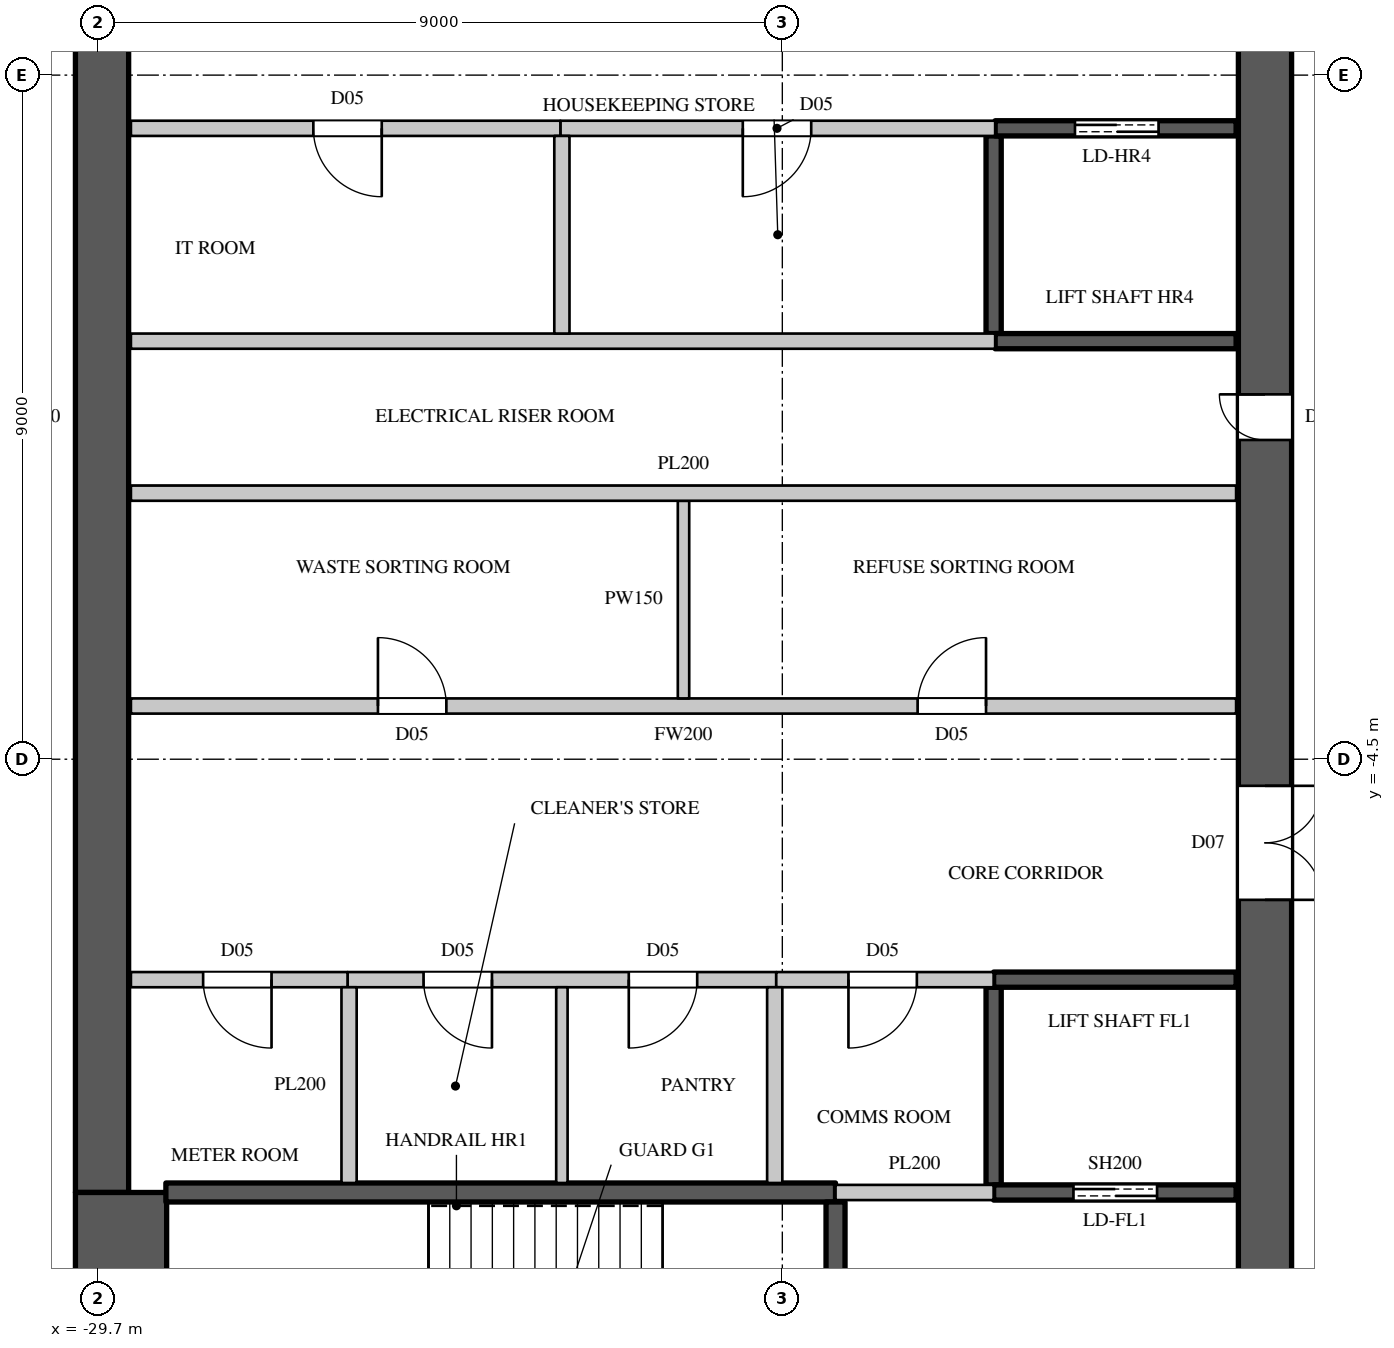
"""IFC4 building model, lengths in metres.
Left out: names, types, materials, properties, quantities, classifications, styles, units other than length and angle.
Written with IfcOpenShell. Run it as: python <this file> out.ifc"""

import sys

from ifc_helpers import new_model, si_unit, direction, frame, frame_2d, origin, place, context, subcontext, project, spatial, rectangle, extrude, element, fill, save


model = new_model("IFC4")
c1 = context("Model", 3, precision=1e-05, world=origin(), true_north=direction((0.0, 1.0)))
c2 = subcontext(c1, "Body", "Model", "MODEL_VIEW")
j1 = project(units=[si_unit("LENGTHUNIT", "METRE"), si_unit("PLANEANGLEUNIT", "RADIAN")], contexts=[c1])
p1 = place(None, origin())
s1 = spatial("IfcSite", under=j1, at=p1, CompositionType="ELEMENT")
p2 = place(p1, origin())
s2 = spatial("IfcBuilding", under=s1, at=p2, CompositionType="ELEMENT")
p3 = place(p2, frame((0.0, 0.0, 292.6)))
s3 = spatial("IfcBuildingStorey", under=s2, at=p3, CompositionType="ELEMENT", Elevation=292.6)
p4 = place(p3, frame((-14.35, -14.8, 0.0), z_axis=(0.0, 0.0, 1.0), x_axis=(0.0, 1.0, 0.0)))
e1 = element("IfcWall", 1, at=p4, inside=s3, PredefinedType="SHEAR", context=c2, shape_type="SweptSolid", body=[
    extrude(rectangle(XDim=29.6, YDim=0.7, at=frame_2d((14.8, 0.0))), origin(), (0.0, 0.0, 1.0), 4.1),
])
p5 = place(p4, frame((1.55, 0.0, 0.0)))
e2 = element("IfcOpeningElement", 2, at=p5, cuts=e1, PredefinedType="OPENING", context=c2, shape_type="SweptSolid", body=[
    extrude(rectangle(XDim=1.5, YDim=2.4, at=frame_2d((0.75, 1.2))), frame((0.0, 0.36, 0.0), z_axis=(0.0, -1.0, 0.0), x_axis=(1.0, 0.0, 0.0)), (0.0, 0.0, 1.0), 0.72),
])
p6 = place(p4, frame((26.55, 0.0, 0.0)))
e3 = element("IfcOpeningElement", 3, at=p6, cuts=e1, PredefinedType="OPENING", context=c2, shape_type="SweptSolid", body=[
    extrude(rectangle(XDim=1.5, YDim=2.4, at=frame_2d((0.75, 1.2))), frame((0.0, 0.36, 0.0), z_axis=(0.0, -1.0, 0.0), x_axis=(1.0, 0.0, 0.0)), (0.0, 0.0, 1.0), 0.72),
])
p7 = place(p4, frame((8.45, 0.0, 0.0)))
e4 = element("IfcOpeningElement", 4, at=p7, cuts=e1, PredefinedType="OPENING", context=c2, shape_type="SweptSolid", body=[
    extrude(rectangle(XDim=1.5, YDim=2.4, at=frame_2d((0.75, 1.2))), frame((0.0, 0.36, 0.0), z_axis=(0.0, -1.0, 0.0), x_axis=(1.0, 0.0, 0.0)), (0.0, 0.0, 1.0), 0.72),
])
p8 = place(p4, frame((19.65, 0.0, 0.0)))
e5 = element("IfcOpeningElement", 5, at=p8, cuts=e1, PredefinedType="OPENING", context=c2, shape_type="SweptSolid", body=[
    extrude(rectangle(XDim=1.5, YDim=2.4, at=frame_2d((0.75, 1.2))), frame((0.0, 0.36, 0.0), z_axis=(0.0, -1.0, 0.0), x_axis=(1.0, 0.0, 0.0)), (0.0, 0.0, 1.0), 0.72),
])
p9 = place(p4, frame((14.5, 0.0, 0.0)))
e6 = element("IfcOpeningElement", 6, at=p9, cuts=e1, PredefinedType="OPENING", context=c2, shape_type="SweptSolid", body=[
    extrude(rectangle(XDim=0.6, YDim=2.0, at=frame_2d((0.3, 1.0))), frame((0.0, 0.36, 0.0), z_axis=(0.0, -1.0, 0.0), x_axis=(1.0, 0.0, 0.0)), (0.0, 0.0, 1.0), 0.72),
])
p10 = place(p3, frame((-29.65, -10.2, 0.0), z_axis=(0.0, 0.0, 1.0), x_axis=(0.0, 1.0, 0.0)))
e7 = element("IfcWall", 7, at=p10, inside=s3, PredefinedType="SHEAR", context=c2, shape_type="SweptSolid", body=[
    extrude(rectangle(XDim=20.4, YDim=0.7, at=frame_2d((10.2, 0.0))), origin(), (0.0, 0.0, 1.0), 4.1),
])
p11 = place(p3, frame((-29.4, -14.8, 0.0), z_axis=(0.0, 0.0, 1.0), x_axis=(0.0, 1.0, 0.0)))
e8 = element("IfcWall", 8, at=p11, inside=s3, PredefinedType="SHEAR", context=c2, shape_type="SweptSolid", body=[
    extrude(rectangle(XDim=4.6, YDim=1.2, at=frame_2d((2.3, 0.0))), origin(), (0.0, 0.0, 1.0), 4.1),
])
p12 = place(p3, frame((-29.27, -3.8, 0.0), z_axis=(0.0, 0.0, 1.0), x_axis=(1.0, 0.0, 0.0)))
e9 = element("IfcWall", 9, at=p12, inside=s3, PredefinedType="PARTITIONING", context=c2, shape_type="SweptSolid", body=[
    extrude(rectangle(XDim=14.54, YDim=0.2, at=frame_2d((7.27, 0.0))), origin(), (0.0, 0.0, 1.0), 3.8),
])
p13 = place(p12, frame((3.25, 0.0, 0.0)))
e10 = element("IfcOpeningElement", 10, at=p13, cuts=e9, PredefinedType="OPENING", context=c2, shape_type="SweptSolid", body=[
    extrude(rectangle(XDim=0.9, YDim=2.2, at=frame_2d((0.45, 1.1))), frame((0.0, 0.11, 0.0), z_axis=(0.0, -1.0, 0.0), x_axis=(1.0, 0.0, 0.0)), (0.0, 0.0, 1.0), 0.22),
])
p14 = place(p12, frame((10.35, 0.0, 0.0)))
e11 = element("IfcOpeningElement", 11, at=p14, cuts=e9, PredefinedType="OPENING", context=c2, shape_type="SweptSolid", body=[
    extrude(rectangle(XDim=0.9, YDim=2.2, at=frame_2d((0.45, 1.1))), frame((0.0, 0.11, 0.0), z_axis=(0.0, -1.0, 0.0), x_axis=(1.0, 0.0, 0.0)), (0.0, 0.0, 1.0), 0.22),
])
p15 = place(p3, frame((-26.42, -7.4, 0.0), z_axis=(0.0, 0.0, 1.0), x_axis=(1.0, 0.0, 0.0)))
e12 = element("IfcWall", 12, at=p15, inside=s3, PredefinedType="PARTITIONING", context=c2, shape_type="SweptSolid", body=[
    extrude(rectangle(XDim=5.64, YDim=0.2, at=frame_2d((2.82, 0.0))), origin(), (0.0, 0.0, 1.0), 3.8),
])
p16 = place(p15, frame((1.0, 0.0, 0.0)))
e13 = element("IfcOpeningElement", 13, at=p16, cuts=e12, PredefinedType="OPENING", context=c2, shape_type="SweptSolid", body=[
    extrude(rectangle(XDim=0.9, YDim=2.2, at=frame_2d((0.45, 1.1))), frame((0.0, 0.11, 0.0), z_axis=(0.0, -1.0, 0.0), x_axis=(1.0, 0.0, 0.0)), (0.0, 0.0, 1.0), 0.22),
])
p17 = place(p15, frame((3.7, 0.0, 0.0)))
e14 = element("IfcOpeningElement", 14, at=p17, cuts=e12, PredefinedType="OPENING", context=c2, shape_type="SweptSolid", body=[
    extrude(rectangle(XDim=0.9, YDim=2.2, at=frame_2d((0.45, 1.1))), frame((0.0, 0.11, 0.0), z_axis=(0.0, -1.0, 0.0), x_axis=(1.0, 0.0, 0.0)), (0.0, 0.0, 1.0), 0.22),
])
p18 = place(p3, frame((-23.62, 3.8, 0.0), z_axis=(0.0, 0.0, 1.0), x_axis=(1.0, 0.0, 0.0)))
e15 = element("IfcWall", 15, at=p18, inside=s3, PredefinedType="PARTITIONING", context=c2, shape_type="SweptSolid", body=[
    extrude(rectangle(XDim=5.72, YDim=0.2, at=frame_2d((2.86, 0.0))), origin(), (0.0, 0.0, 1.0), 3.8),
])
p19 = place(p18, frame((2.4, 0.0, 0.0)))
e16 = element("IfcOpeningElement", 16, at=p19, cuts=e15, PredefinedType="OPENING", context=c2, shape_type="SweptSolid", body=[
    extrude(rectangle(XDim=0.9, YDim=2.2, at=frame_2d((0.45, 1.1))), frame((0.0, 0.11, 0.0), z_axis=(0.0, -1.0, 0.0), x_axis=(1.0, 0.0, 0.0)), (0.0, 0.0, 1.0), 0.22),
])
p20 = place(p3, frame((-23.6, -10.075, 0.0), z_axis=(0.0, 0.0, 1.0), x_axis=(0.0, 1.0, 0.0)))
e17 = element("IfcWall", 17, at=p20, inside=s3, PredefinedType="PARTITIONING", context=c2, shape_type="SweptSolid", body=[
    extrude(rectangle(XDim=2.575, YDim=0.15, at=frame_2d((1.288, 0.0))), origin(), (0.0, 0.0, 1.0), 3.8),
])
p21 = place(p3, frame((-22.0, -3.7, 0.0), z_axis=(0.0, 0.0, 1.0), x_axis=(0.0, 1.0, 0.0)))
e18 = element("IfcWall", 18, at=p21, inside=s3, PredefinedType="PARTITIONING", context=c2, shape_type="SweptSolid", body=[
    extrude(rectangle(XDim=2.6, YDim=0.15, at=frame_2d((1.3, 0.0))), origin(), (0.0, 0.0, 1.0), 3.8),
])
p22 = place(p3, frame((-29.27, -7.4, 0.0), z_axis=(0.0, 0.0, 1.0), x_axis=(1.0, 0.0, 0.0)))
e19 = element("IfcWall", 19, at=p22, inside=s3, PredefinedType="PARTITIONING", context=c2, shape_type="SweptSolid", body=[
    extrude(rectangle(XDim=2.85, YDim=0.2, at=frame_2d((1.425, 0.0))), origin(), (0.0, 0.0, 1.0), 3.8),
])
p23 = place(p22, frame((0.95, 0.0, 0.0)))
e20 = element("IfcOpeningElement", 20, at=p23, cuts=e19, PredefinedType="OPENING", context=c2, shape_type="SweptSolid", body=[
    extrude(rectangle(XDim=0.9, YDim=2.2, at=frame_2d((0.45, 1.1))), frame((0.0, 0.11, 0.0), z_axis=(0.0, -1.0, 0.0), x_axis=(1.0, 0.0, 0.0)), (0.0, 0.0, 1.0), 0.22),
])
p24 = place(p3, frame((-29.27, -1.0, 0.0), z_axis=(0.0, 0.0, 1.0), x_axis=(1.0, 0.0, 0.0)))
e21 = element("IfcWall", 21, at=p24, inside=s3, PredefinedType="PARTITIONING", context=c2, shape_type="SweptSolid", body=[
    extrude(rectangle(XDim=14.54, YDim=0.2, at=frame_2d((7.27, 0.0))), origin(), (0.0, 0.0, 1.0), 3.8),
])
p25 = place(p3, frame((-29.27, 1.0, 0.0), z_axis=(0.0, 0.0, 1.0), x_axis=(1.0, 0.0, 0.0)))
e22 = element("IfcWall", 22, at=p25, inside=s3, PredefinedType="PARTITIONING", context=c2, shape_type="SweptSolid", body=[
    extrude(rectangle(XDim=11.37, YDim=0.2, at=frame_2d((5.685, 0.0))), origin(), (0.0, 0.0, 1.0), 3.8),
])
p26 = place(p3, frame((-29.27, 3.8, 0.0), z_axis=(0.0, 0.0, 1.0), x_axis=(1.0, 0.0, 0.0)))
e23 = element("IfcWall", 23, at=p26, inside=s3, PredefinedType="PARTITIONING", context=c2, shape_type="SweptSolid", body=[
    extrude(rectangle(XDim=5.65, YDim=0.2, at=frame_2d((2.825, 0.0))), origin(), (0.0, 0.0, 1.0), 3.8),
])
p27 = place(p26, frame((2.4, 0.0, 0.0)))
e24 = element("IfcOpeningElement", 24, at=p27, cuts=e23, PredefinedType="OPENING", context=c2, shape_type="SweptSolid", body=[
    extrude(rectangle(XDim=0.9, YDim=2.2, at=frame_2d((0.45, 1.1))), frame((0.0, 0.11, 0.0), z_axis=(0.0, -1.0, 0.0), x_axis=(1.0, 0.0, 0.0)), (0.0, 0.0, 1.0), 0.22),
])
p28 = place(p3, frame((-26.4, -10.075, 0.0), z_axis=(0.0, 0.0, 1.0), x_axis=(0.0, 1.0, 0.0)))
e25 = element("IfcWall", 25, at=p28, inside=s3, PredefinedType="PARTITIONING", context=c2, shape_type="SweptSolid", body=[
    extrude(rectangle(XDim=2.575, YDim=0.2, at=frame_2d((1.288, 0.0))), origin(), (0.0, 0.0, 1.0), 3.8),
])
p29 = place(p3, frame((-23.6, 1.1, 0.0), z_axis=(0.0, 0.0, 1.0), x_axis=(0.0, 1.0, 0.0)))
e26 = element("IfcWall", 26, at=p29, inside=s3, PredefinedType="PARTITIONING", context=c2, shape_type="SweptSolid", body=[
    extrude(rectangle(XDim=2.6, YDim=0.2, at=frame_2d((1.3, 0.0))), origin(), (0.0, 0.0, 1.0), 3.8),
])
p30 = place(p3, frame((-20.78, -7.4, 0.0), z_axis=(0.0, 0.0, 1.0), x_axis=(1.0, 0.0, 0.0)))
e27 = element("IfcWall", 27, at=p30, inside=s3, PredefinedType="PARTITIONING", context=c2, shape_type="SweptSolid", body=[
    extrude(rectangle(XDim=2.86, YDim=0.2, at=frame_2d((1.43, 0.0))), origin(), (0.0, 0.0, 1.0), 3.8),
])
p31 = place(p30, frame((0.95, 0.0, 0.0)))
e28 = element("IfcOpeningElement", 28, at=p31, cuts=e27, PredefinedType="OPENING", context=c2, shape_type="SweptSolid", body=[
    extrude(rectangle(XDim=0.9, YDim=2.2, at=frame_2d((0.45, 1.1))), frame((0.0, 0.11, 0.0), z_axis=(0.0, -1.0, 0.0), x_axis=(1.0, 0.0, 0.0)), (0.0, 0.0, 1.0), 0.22),
])
p32 = place(p3, frame((-20.8, -10.075, 0.0), z_axis=(0.0, 0.0, 1.0), x_axis=(0.0, 1.0, 0.0)))
e29 = element("IfcWall", 29, at=p32, inside=s3, PredefinedType="PARTITIONING", context=c2, shape_type="SweptSolid", body=[
    extrude(rectangle(XDim=2.575, YDim=0.2, at=frame_2d((1.288, 0.0))), origin(), (0.0, 0.0, 1.0), 3.8),
])
p33 = place(p3, frame((-20.0, -10.2, 0.0), z_axis=(0.0, 0.0, 1.0), x_axis=(1.0, 0.0, 0.0)))
e30 = element("IfcWall", 30, at=p33, inside=s3, PredefinedType="PARTITIONING", context=c2, shape_type="SweptSolid", body=[
    extrude(rectangle(XDim=2.08, YDim=0.2, at=frame_2d((1.04, 0.0))), origin(), (0.0, 0.0, 1.0), 3.8),
])
p34 = place(p3, frame((-17.92, -10.1, 0.0), z_axis=(0.0, 0.0, 1.0), x_axis=(0.0, 1.0, 0.0)))
e31 = element("IfcWall", 31, at=p34, inside=s3, PredefinedType="SHEAR", context=c2, shape_type="SweptSolid", body=[
    extrude(rectangle(XDim=2.6, YDim=0.2, at=frame_2d((1.3, 0.0))), origin(), (0.0, 0.0, 1.0), 3.8),
])
p35 = place(p3, frame((-17.92, -10.2, 0.0), z_axis=(0.0, 0.0, 1.0), x_axis=(1.0, 0.0, 0.0)))
e32 = element("IfcWall", 32, at=p35, inside=s3, PredefinedType="SHEAR", context=c2, shape_type="SweptSolid", body=[
    extrude(rectangle(XDim=3.19, YDim=0.2, at=frame_2d((1.595, 0.0))), origin(), (0.0, 0.0, 1.0), 3.8),
])
p36 = place(p35, frame((1.05, 0.0, 0.0)))
e33 = element("IfcOpeningElement", 33, at=p36, cuts=e32, PredefinedType="OPENING", context=c2, shape_type="SweptSolid", body=[
    extrude(rectangle(XDim=1.1, YDim=2.2, at=frame_2d((0.55, 1.1))), frame((0.0, 0.11, 0.0), z_axis=(0.0, -1.0, 0.0), x_axis=(1.0, 0.0, 0.0)), (0.0, 0.0, 1.0), 0.22),
])
p37 = place(p3, frame((-17.92, -7.4, 0.0), z_axis=(0.0, 0.0, 1.0), x_axis=(1.0, 0.0, 0.0)))
e34 = element("IfcWall", 34, at=p37, inside=s3, PredefinedType="SHEAR", context=c2, shape_type="SweptSolid", body=[
    extrude(rectangle(XDim=3.19, YDim=0.2, at=frame_2d((1.595, 0.0))), origin(), (0.0, 0.0, 1.0), 3.8),
])
p38 = place(p3, frame((-17.92, 1.1, 0.0), z_axis=(0.0, 0.0, 1.0), x_axis=(0.0, 1.0, 0.0)))
e35 = element("IfcWall", 35, at=p38, inside=s3, PredefinedType="SHEAR", context=c2, shape_type="SweptSolid", body=[
    extrude(rectangle(XDim=2.6, YDim=0.2, at=frame_2d((1.3, 0.0))), origin(), (0.0, 0.0, 1.0), 3.8),
])
p39 = place(p3, frame((-17.9, 1.0, 0.0), z_axis=(0.0, 0.0, 1.0), x_axis=(1.0, 0.0, 0.0)))
e36 = element("IfcWall", 36, at=p39, inside=s3, PredefinedType="SHEAR", context=c2, shape_type="SweptSolid", body=[
    extrude(rectangle(XDim=3.17, YDim=0.2, at=frame_2d((1.585, 0.0))), origin(), (0.0, 0.0, 1.0), 3.8),
])
p40 = place(p3, frame((-17.9, 3.8, 0.0), z_axis=(0.0, 0.0, 1.0), x_axis=(1.0, 0.0, 0.0)))
e37 = element("IfcWall", 37, at=p40, inside=s3, PredefinedType="SHEAR", context=c2, shape_type="SweptSolid", body=[
    extrude(rectangle(XDim=3.17, YDim=0.2, at=frame_2d((1.585, 0.0))), origin(), (0.0, 0.0, 1.0), 3.8),
])
p41 = place(p40, frame((1.05, 0.0, 0.0)))
e38 = element("IfcOpeningElement", 38, at=p41, cuts=e37, PredefinedType="OPENING", context=c2, shape_type="SweptSolid", body=[
    extrude(rectangle(XDim=1.1, YDim=2.2, at=frame_2d((0.55, 1.1))), frame((0.0, 0.11, 0.0), z_axis=(0.0, -1.0, 0.0), x_axis=(1.0, 0.0, 0.0)), (0.0, 0.0, 1.0), 0.22),
])
p42 = place(p3, frame((-28.81, -10.2, 0.0), z_axis=(0.0, 0.0, 1.0), x_axis=(1.0, 0.0, 0.0)))
e39 = element("IfcWall", 39, at=p42, inside=s3, PredefinedType="SHEAR", context=c2, shape_type="SweptSolid", body=[
    extrude(rectangle(XDim=8.81, YDim=0.25, at=frame_2d((4.405, 0.0))), origin(), (0.0, 0.0, 1.0), 3.8),
])
p43 = place(p3, frame((-20.0, -14.77, 0.0), z_axis=(0.0, 0.0, 1.0), x_axis=(0.0, 1.0, 0.0)))
e40 = element("IfcWall", 40, at=p43, inside=s3, PredefinedType="SHEAR", context=c2, shape_type="SweptSolid", body=[
    extrude(rectangle(XDim=4.445, YDim=0.25, at=frame_2d((2.223, 0.0))), origin(), (0.0, 0.0, 1.0), 3.8),
])
p44 = place(p43, frame((1.7, 0.0, 0.0)))
e41 = element("IfcOpeningElement", 41, at=p44, cuts=e40, PredefinedType="OPENING", context=c2, shape_type="SweptSolid", body=[
    extrude(rectangle(XDim=1.1, YDim=2.2, at=frame_2d((0.55, 1.1))), frame((0.0, 0.135, 0.0), z_axis=(0.0, -1.0, 0.0), x_axis=(1.0, 0.0, 0.0)), (0.0, 0.0, 1.0), 0.27),
])
p45 = place(p23, origin())
e42 = element("IfcDoor", 42, at=p45, inside=s3, OperationType="SINGLE_SWING_LEFT", PredefinedType="DOOR", context=c2, shape_type="SweptSolid", body=[
    extrude(rectangle(XDim=0.9, YDim=2.2, at=frame_2d((0.45, 1.1))), frame((0.0, 0.025, 0.0), z_axis=(0.0, -1.0, 0.0), x_axis=(1.0, 0.0, 0.0)), (0.0, 0.0, 1.0), 0.05),
])
fill(e20, e42)
p46 = place(p16, origin())
e43 = element("IfcDoor", 43, at=p46, inside=s3, OperationType="SINGLE_SWING_LEFT", PredefinedType="DOOR", context=c2, shape_type="SweptSolid", body=[
    extrude(rectangle(XDim=0.9, YDim=2.2, at=frame_2d((0.45, 1.1))), frame((0.0, 0.025, 0.0), z_axis=(0.0, -1.0, 0.0), x_axis=(1.0, 0.0, 0.0)), (0.0, 0.0, 1.0), 0.05),
])
fill(e13, e43)
p47 = place(p17, origin())
e44 = element("IfcDoor", 44, at=p47, inside=s3, OperationType="SINGLE_SWING_RIGHT", PredefinedType="DOOR", context=c2, shape_type="SweptSolid", body=[
    extrude(rectangle(XDim=0.9, YDim=2.2, at=frame_2d((0.45, 1.1))), frame((0.0, 0.025, 0.0), z_axis=(0.0, -1.0, 0.0), x_axis=(1.0, 0.0, 0.0)), (0.0, 0.0, 1.0), 0.05),
])
fill(e14, e44)
p48 = place(p31, origin())
e45 = element("IfcDoor", 45, at=p48, inside=s3, OperationType="SINGLE_SWING_RIGHT", PredefinedType="DOOR", context=c2, shape_type="SweptSolid", body=[
    extrude(rectangle(XDim=0.9, YDim=2.2, at=frame_2d((0.45, 1.1))), frame((0.0, 0.025, 0.0), z_axis=(0.0, -1.0, 0.0), x_axis=(1.0, 0.0, 0.0)), (0.0, 0.0, 1.0), 0.05),
])
fill(e28, e45)
p49 = place(p13, origin())
e46 = element("IfcDoor", 46, at=p49, inside=s3, OperationType="SINGLE_SWING_LEFT", PredefinedType="DOOR", context=c2, shape_type="SweptSolid", body=[
    extrude(rectangle(XDim=0.9, YDim=2.2, at=frame_2d((0.45, 1.1))), frame((0.0, 0.025, 0.0), z_axis=(0.0, -1.0, 0.0), x_axis=(1.0, 0.0, 0.0)), (0.0, 0.0, 1.0), 0.05),
])
fill(e10, e46)
p50 = place(p14, origin())
e47 = element("IfcDoor", 47, at=p50, inside=s3, OperationType="SINGLE_SWING_RIGHT", PredefinedType="DOOR", context=c2, shape_type="SweptSolid", body=[
    extrude(rectangle(XDim=0.9, YDim=2.2, at=frame_2d((0.45, 1.1))), frame((0.0, 0.025, 0.0), z_axis=(0.0, -1.0, 0.0), x_axis=(1.0, 0.0, 0.0)), (0.0, 0.0, 1.0), 0.05),
])
fill(e11, e47)
p51 = place(p27, origin())
e48 = element("IfcDoor", 48, at=p51, inside=s3, OperationType="SINGLE_SWING_LEFT", PredefinedType="DOOR", context=c2, shape_type="SweptSolid", body=[
    extrude(rectangle(XDim=0.9, YDim=2.2, at=frame_2d((0.45, 1.1))), frame((0.0, 0.025, 0.0), z_axis=(0.0, -1.0, 0.0), x_axis=(1.0, 0.0, 0.0)), (0.0, 0.0, 1.0), 0.05),
])
fill(e24, e48)
p52 = place(p19, origin())
e49 = element("IfcDoor", 49, at=p52, inside=s3, OperationType="SINGLE_SWING_RIGHT", PredefinedType="DOOR", context=c2, shape_type="SweptSolid", body=[
    extrude(rectangle(XDim=0.9, YDim=2.2, at=frame_2d((0.45, 1.1))), frame((0.0, 0.025, 0.0), z_axis=(0.0, -1.0, 0.0), x_axis=(1.0, 0.0, 0.0)), (0.0, 0.0, 1.0), 0.05),
])
fill(e16, e49)
p53 = place(p36, origin())
e50 = element("IfcDoor", 50, at=p53, inside=s3, OperationType="DOUBLE_DOOR_SLIDING", PredefinedType="DOOR", context=c2, shape_type="SweptSolid", body=[
    extrude(rectangle(XDim=1.1, YDim=2.2, at=frame_2d((0.55, 1.1))), frame((0.0, 0.025, 0.0), z_axis=(0.0, -1.0, 0.0), x_axis=(1.0, 0.0, 0.0)), (0.0, 0.0, 1.0), 0.05),
])
fill(e33, e50)
p54 = place(p41, origin())
e51 = element("IfcDoor", 51, at=p54, inside=s3, OperationType="DOUBLE_DOOR_SLIDING", PredefinedType="DOOR", context=c2, shape_type="SweptSolid", body=[
    extrude(rectangle(XDim=1.1, YDim=2.2, at=frame_2d((0.55, 1.1))), frame((0.0, 0.025, 0.0), z_axis=(0.0, -1.0, 0.0), x_axis=(1.0, 0.0, 0.0)), (0.0, 0.0, 1.0), 0.05),
])
fill(e38, e51)
p55 = place(p7, origin())
e52 = element("IfcDoor", 52, at=p55, inside=s3, OperationType="DOUBLE_DOOR_SINGLE_SWING", PredefinedType="DOOR", context=c2, shape_type="SweptSolid", body=[
    extrude(rectangle(XDim=1.5, YDim=2.4, at=frame_2d((0.75, 1.2))), frame((0.0, -0.295, 0.0), z_axis=(0.0, -1.0, 0.0), x_axis=(1.0, 0.0, 0.0)), (0.0, 0.0, 1.0), 0.05),
])
fill(e4, e52)
p56 = place(p9, origin())
e53 = element("IfcDoor", 53, at=p56, inside=s3, OperationType="SINGLE_SWING_RIGHT", PredefinedType="DOOR", context=c2, shape_type="SweptSolid", body=[
    extrude(rectangle(XDim=0.6, YDim=2.0, at=frame_2d((0.3, 1.0))), frame((0.0, 0.345, 0.0), z_axis=(0.0, -1.0, 0.0), x_axis=(1.0, 0.0, 0.0)), (0.0, 0.0, 1.0), 0.05),
])
fill(e6, e53)
save(model, sys.argv[1])
